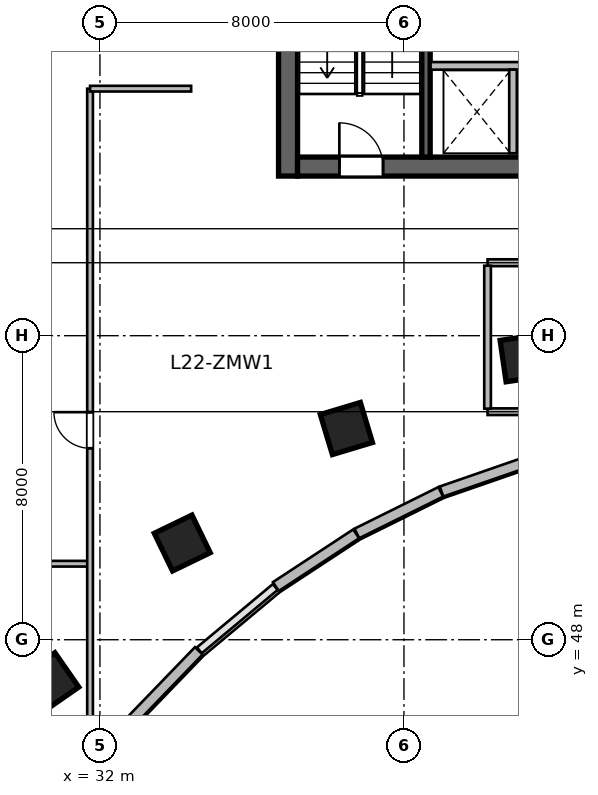
"""IFC4 building model, lengths in metres.
Left out: names, types, materials, properties, quantities, classifications, styles, units other than length and angle.
Written with IfcOpenShell. Run it as: python <this file> out.ifc"""

import sys

from ifc_helpers import new_model, si_unit, direction, frame, frame_2d, origin, origin_2d, place, context, subcontext, project, spatial, rectangle, extrude, source, transform, mapped, element, fill, save


model = new_model("IFC4")
c1 = context("Model", 3, precision=1e-05, world=origin(), true_north=direction((0.0, 1.0)))
c2 = subcontext(c1, "Body", "Model", "MODEL_VIEW")
j1 = project(units=[si_unit("LENGTHUNIT", "METRE"), si_unit("PLANEANGLEUNIT", "RADIAN")], contexts=[c1])
p1 = place(None, origin())
s1 = spatial("IfcSite", under=j1, at=p1, CompositionType="ELEMENT")
p2 = place(p1, origin())
s2 = spatial("IfcBuilding", under=s1, at=p2, CompositionType="ELEMENT")
p3 = place(p2, frame((0.0, 0.0, 96.0)))
s3 = spatial("IfcBuildingStorey", under=s2, at=p3, CompositionType="ELEMENT", Elevation=96.0)
m1 = source(origin(), c2, "Body", "SweptSolid", [
    extrude(rectangle(XDim=12.0, YDim=0.5, at=frame_2d((6.0, 0.0))), origin(), (0.0, 0.0, 1.0), 3.9),
])
p4 = place(p3, frame((36.95, 60.2, 0.0), z_axis=(0.0, 0.0, 1.0), x_axis=(0.0, 1.0, 0.0)))
e1 = element("IfcWall", 1, at=p4, inside=s3, PredefinedType="SHEAR", context=c2, shape_type="MappedRepresentation", body=[
    mapped(m1, transform((0.0, 0.0, 0.0), scale=1.0)),
])
m2 = source(origin(), c2, "Body", "SweptSolid", [
    extrude(rectangle(XDim=21.6, YDim=0.5, at=frame_2d((10.8, 0.0))), origin(), (0.0, 0.0, 1.0), 3.9),
])
p5 = place(p3, frame((37.2, 60.45, 0.0), z_axis=(0.0, 0.0, 1.0), x_axis=(1.0, 0.0, 0.0)))
e2 = element("IfcWall", 2, at=p5, inside=s3, PredefinedType="SHEAR", context=c2, shape_type="MappedRepresentation", body=[
    mapped(m2, transform((0.0, 0.0, 0.0), scale=1.0)),
])
p6 = place(p5, frame((1.1, 0.0, 0.0)))
e3 = element("IfcOpeningElement", 3, at=p6, cuts=e2, PredefinedType="OPENING", context=c2, shape_type="SweptSolid", body=[
    extrude(rectangle(XDim=1.15, YDim=2.15, at=frame_2d((0.575, 1.075))), frame((0.0, 0.26, 0.0), z_axis=(0.0, -1.0, 0.0), x_axis=(1.0, 0.0, 0.0)), (0.0, 0.0, 1.0), 0.52),
])
p7 = place(p5, frame((19.5, 0.0, 0.0)))
e4 = element("IfcOpeningElement", 4, at=p7, cuts=e2, PredefinedType="OPENING", context=c2, shape_type="SweptSolid", body=[
    extrude(rectangle(XDim=0.9, YDim=2.1, at=frame_2d((0.45, 1.05))), frame((0.0, 0.26, 0.0), z_axis=(0.0, -1.0, 0.0), x_axis=(1.0, 0.0, 0.0)), (0.0, 0.0, 1.0), 0.52),
])
p8 = place(p5, frame((12.02, 0.0, 0.0)))
e5 = element("IfcOpeningElement", 5, at=p8, cuts=e2, PredefinedType="OPENING", context=c2, shape_type="SweptSolid", body=[
    extrude(rectangle(XDim=1.6, YDim=2.15, at=frame_2d((0.8, 1.075))), frame((0.0, 0.26, 0.0), z_axis=(0.0, -1.0, 0.0), x_axis=(1.0, 0.0, 0.0)), (0.0, 0.0, 1.0), 0.52),
])
m3 = source(origin(), c2, "Body", "SweptSolid", [
    extrude(rectangle(XDim=11.0, YDim=0.22, at=frame_2d((5.5, 0.0))), origin(), (0.0, 0.0, 1.0), 3.9),
])
p9 = place(p3, frame((40.58, 60.7, 0.0), z_axis=(0.0, 0.0, 1.0), x_axis=(0.0, 1.0, 0.0)))
e6 = element("IfcWall", 6, at=p9, inside=s3, PredefinedType="SHEAR", context=c2, shape_type="MappedRepresentation", body=[
    mapped(m3, transform((0.0, 0.0, 0.0), scale=1.0)),
])
m4 = source(origin(), c2, "Body", "SweptSolid", [
    extrude(rectangle(XDim=1.1, YDim=1.1, at=origin_2d()), origin(), (0.0, 0.0, 1.0), 3.9),
])
for number, where, z_axis, x_axis in (
    (7, (30.677, 46.892, 0.0), (0.0, 0.0, 1.0), (-0.571, 0.821, 0.0)),
    (8, (34.166, 50.545, 0.0), (0.0, 0.0, 1.0), (-0.436, 0.9, 0.0)),
    (9, (38.485, 53.558, 0.0), (0.0, 0.0, 1.0), (-0.289, 0.957, 0.0)),
    (10, (43.154, 55.411, 0.0), (0.0, 0.0, 1.0), (-0.143, 0.99, 0.0)),
):
    element("IfcColumn", number, at=place(p3, frame(where, z_axis=z_axis, x_axis=x_axis)), inside=s3, PredefinedType="COLUMN", context=c2, shape_type="MappedRepresentation", body=[
        mapped(m4, transform((0.0, 0.0, 0.0), scale=1.0)),
    ])
m5 = source(origin(), c2, "Body", "SweptSolid", [
    extrude(rectangle(XDim=2.411, YDim=0.28, at=frame_2d((1.205, 0.0))), origin(), (0.0, 0.0, 1.0), 3.65),
])
p10 = place(p3, frame((43.266, 52.689, 0.0), z_axis=(0.0, 0.0, 1.0), x_axis=(-0.944880068161, -0.327416640982, 0.0)))
e11 = element("IfcWall", 11, at=p10, inside=s3, PredefinedType="SOLIDWALL", context=c2, shape_type="MappedRepresentation", body=[
    mapped(m5, transform((0.0, 0.0, 0.0), scale=1.0)),
])
m6 = source(origin(), c2, "Body", "SweptSolid", [
    extrude(rectangle(XDim=2.462, YDim=0.28, at=frame_2d((1.231, 0.0))), origin(), (0.0, 0.0, 1.0), 3.65),
])
p11 = place(p3, frame((40.967, 51.891, 0.0), z_axis=(0.0, 0.0, 1.0), x_axis=(-0.8959882207, -0.444077817917, 0.0)))
e12 = element("IfcWall", 12, at=p11, inside=s3, PredefinedType="SOLIDWALL", context=c2, shape_type="MappedRepresentation", body=[
    mapped(m6, transform((0.0, 0.0, 0.0), scale=1.0)),
])
m7 = source(origin(), c2, "Body", "SweptSolid", [
    extrude(rectangle(XDim=2.527, YDim=0.28, at=frame_2d((1.264, 0.0))), origin(), (0.0, 0.0, 1.0), 3.65),
])
p12 = place(p3, frame((38.742, 50.786, 0.0), z_axis=(0.0, 0.0, 1.0), x_axis=(-0.836011905051, -0.548711303523, 0.0)))
e13 = element("IfcWall", 13, at=p12, inside=s3, PredefinedType="SOLIDWALL", context=c2, shape_type="MappedRepresentation", body=[
    mapped(m7, transform((0.0, 0.0, 0.0), scale=1.0)),
])
m8 = source(origin(), c2, "Body", "SweptSolid", [
    extrude(rectangle(XDim=2.68, YDim=0.28, at=frame_2d((1.34, 0.0))), origin(), (0.0, 0.0, 1.0), 3.65),
])
p13 = place(p3, frame((34.601, 47.708, 0.0), z_axis=(0.0, 0.0, 1.0), x_axis=(-0.694561996568, -0.719432855049, 0.0)))
e14 = element("IfcWall", 14, at=p13, inside=s3, PredefinedType="SOLIDWALL", context=c2, shape_type="MappedRepresentation", body=[
    mapped(m8, transform((0.0, 0.0, 0.0), scale=1.0)),
])
m9 = source(origin(), c2, "Body", "SweptSolid", [
    extrude(rectangle(XDim=8.02, YDim=0.2, at=frame_2d((4.01, 0.0))), origin(), (0.0, 0.0, 1.0), 3.65),
])
p14 = place(p3, frame((40.7, 63.1, 0.0), z_axis=(0.0, 0.0, 1.0), x_axis=(1.0, 0.0, 0.0)))
e15 = element("IfcWall", 15, at=p14, inside=s3, PredefinedType="SOLIDWALL", context=c2, shape_type="MappedRepresentation", body=[
    mapped(m9, transform((0.0, 0.0, 0.0), scale=1.0)),
])
m10 = source(origin(), c2, "Body", "SweptSolid", [
    extrude(rectangle(XDim=2.2, YDim=0.2, at=frame_2d((1.1, 0.0))), origin(), (0.0, 0.0, 1.0), 3.65),
])
p15 = place(p3, frame((42.87, 60.8, 0.0), z_axis=(0.0, 0.0, 1.0), x_axis=(0.0, 1.0, 0.0)))
e16 = element("IfcWall", 16, at=p15, inside=s3, PredefinedType="SOLIDWALL", context=c2, shape_type="MappedRepresentation", body=[
    mapped(m10, transform((0.0, 0.0, 0.0), scale=1.0)),
])
m11 = source(origin(), c2, "Body", "SweptSolid", [
    extrude(rectangle(XDim=4.176, YDim=0.175, at=frame_2d((2.088, 0.0))), origin(), (0.0, 0.0, 1.0), 3.65),
])
p16 = place(p3, frame((42.2, 54.0, 0.0), z_axis=(0.0, 0.0, 1.0), x_axis=(1.0, 0.0, 0.0)))
e17 = element("IfcWall", 17, at=p16, inside=s3, PredefinedType="PARTITIONING", context=c2, shape_type="MappedRepresentation", body=[
    mapped(m11, transform((0.0, 0.0, 0.0), scale=1.0)),
])
m12 = source(origin(), c2, "Body", "SweptSolid", [
    extrude(rectangle(XDim=4.176, YDim=0.18, at=frame_2d((2.088, 0.0))), origin(), (0.0, 0.0, 1.0), 3.65),
])
p17 = place(p3, frame((42.2, 57.92, 0.0), z_axis=(0.0, 0.0, 1.0), x_axis=(1.0, 0.0, 0.0)))
e18 = element("IfcWall", 18, at=p17, inside=s3, PredefinedType="PLUMBINGWALL", context=c2, shape_type="MappedRepresentation", body=[
    mapped(m12, transform((0.0, 0.0, 0.0), scale=1.0)),
])
p18 = place(p17, frame((1.638, 0.0, 0.0)))
e19 = element("IfcOpeningElement", 19, at=p18, cuts=e18, PredefinedType="OPENING", context=c2, shape_type="SweptSolid", body=[
    extrude(rectangle(XDim=0.9, YDim=2.08, at=frame_2d((0.45, 1.04))), frame((0.0, 0.1, 0.0), z_axis=(0.0, -1.0, 0.0), x_axis=(1.0, 0.0, 0.0)), (0.0, 0.0, 1.0), 0.2),
])
m13 = source(origin(), c2, "Body", "SweptSolid", [
    extrude(rectangle(XDim=3.763, YDim=0.175, at=frame_2d((1.881, 0.0))), origin(), (0.0, 0.0, 1.0), 3.65),
])
p19 = place(p3, frame((42.2, 54.079, 0.0), z_axis=(0.0, 0.0, 1.0), x_axis=(0.0, 1.0, 0.0)))
e20 = element("IfcWall", 20, at=p19, inside=s3, PredefinedType="PARTITIONING", context=c2, shape_type="MappedRepresentation", body=[
    mapped(m13, transform((0.0, 0.0, 0.0), scale=1.0)),
])
m14 = source(origin(), c2, "Body", "SweptSolid", [
    extrude(rectangle(XDim=2.5, YDim=0.15, at=frame_2d((1.25, 0.0))), origin(), (0.0, 0.0, 1.0), 3.65),
])
p20 = place(p3, frame((29.2, 50.0, 0.0), z_axis=(0.0, 0.0, 1.0), x_axis=(1.0, 0.0, 0.0)))
e21 = element("IfcWall", 21, at=p20, inside=s3, PredefinedType="PARTITIONING", context=c2, shape_type="MappedRepresentation", body=[
    mapped(m14, transform((0.0, 0.0, 0.0), scale=1.0)),
])
m15 = source(origin(), c2, "Body", "SweptSolid", [
    extrude(rectangle(XDim=17.974, YDim=0.15, at=frame_2d((8.987, 0.0))), origin(), (0.0, 0.0, 1.0), 2.942),
])
p21 = place(p3, frame((31.74, 44.526, 0.0), z_axis=(0.0, 0.0, 1.0), x_axis=(0.0, 1.0, 0.0)))
e22 = element("IfcWall", 22, at=p21, inside=s3, PredefinedType="PARTITIONING", context=c2, shape_type="MappedRepresentation", body=[
    mapped(m15, transform((0.0, 0.0, 0.0), scale=1.0)),
])
p22 = place(p21, frame((8.512, 0.0, 0.0)))
e23 = element("IfcOpeningElement", 23, at=p22, cuts=e22, PredefinedType="OPENING", context=c2, shape_type="SweptSolid", body=[
    extrude(rectangle(XDim=0.95, YDim=2.1, at=frame_2d((0.475, 1.05))), frame((0.0, 0.085, 0.0), z_axis=(0.0, -1.0, 0.0), x_axis=(1.0, 0.0, 0.0)), (0.0, 0.0, 1.0), 0.17),
])
m16 = source(origin(), c2, "Body", "SweptSolid", [
    extrude(rectangle(XDim=2.66, YDim=0.15, at=frame_2d((1.33, 0.0))), origin(), (0.0, 0.0, 1.0), 3.65),
])
p23 = place(p3, frame((31.74, 62.5, 0.0), z_axis=(0.0, 0.0, 1.0), x_axis=(1.0, 0.0, 0.0)))
e24 = element("IfcWall", 24, at=p23, inside=s3, PredefinedType="PARTITIONING", context=c2, shape_type="MappedRepresentation", body=[
    mapped(m16, transform((0.0, 0.0, 0.0), scale=1.0)),
])
m17 = source(origin(), c2, "Body", "SweptSolid", [
    extrude(rectangle(XDim=1.15, YDim=2.15, at=frame_2d((0.575, 1.075))), frame((0.0, 0.025, 0.0), z_axis=(0.0, -1.0, 0.0), x_axis=(1.0, 0.0, 0.0)), (0.0, 0.0, 1.0), 0.05),
])
p24 = place(p6, origin())
e25 = element("IfcDoor", 25, at=p24, inside=s3, OperationType="SINGLE_SWING_LEFT", PredefinedType="DOOR", context=c2, shape_type="MappedRepresentation", body=[
    mapped(m17, transform((0.0, 0.0, 0.0), scale=1.0)),
])
fill(e3, e25)
m18 = source(origin(), c2, "Body", "SweptSolid", [
    extrude(rectangle(XDim=0.95, YDim=2.1, at=frame_2d((0.475, 1.05))), frame((0.0, 0.025, 0.0), z_axis=(0.0, -1.0, 0.0), x_axis=(1.0, 0.0, 0.0)), (0.0, 0.0, 1.0), 0.05),
])
p25 = place(p22, origin())
e26 = element("IfcDoor", 26, at=p25, inside=s3, OperationType="SINGLE_SWING_RIGHT", PredefinedType="DOOR", context=c2, shape_type="MappedRepresentation", body=[
    mapped(m18, transform((0.0, 0.0, 0.0), scale=1.0)),
])
fill(e23, e26)
save(model, sys.argv[1])
